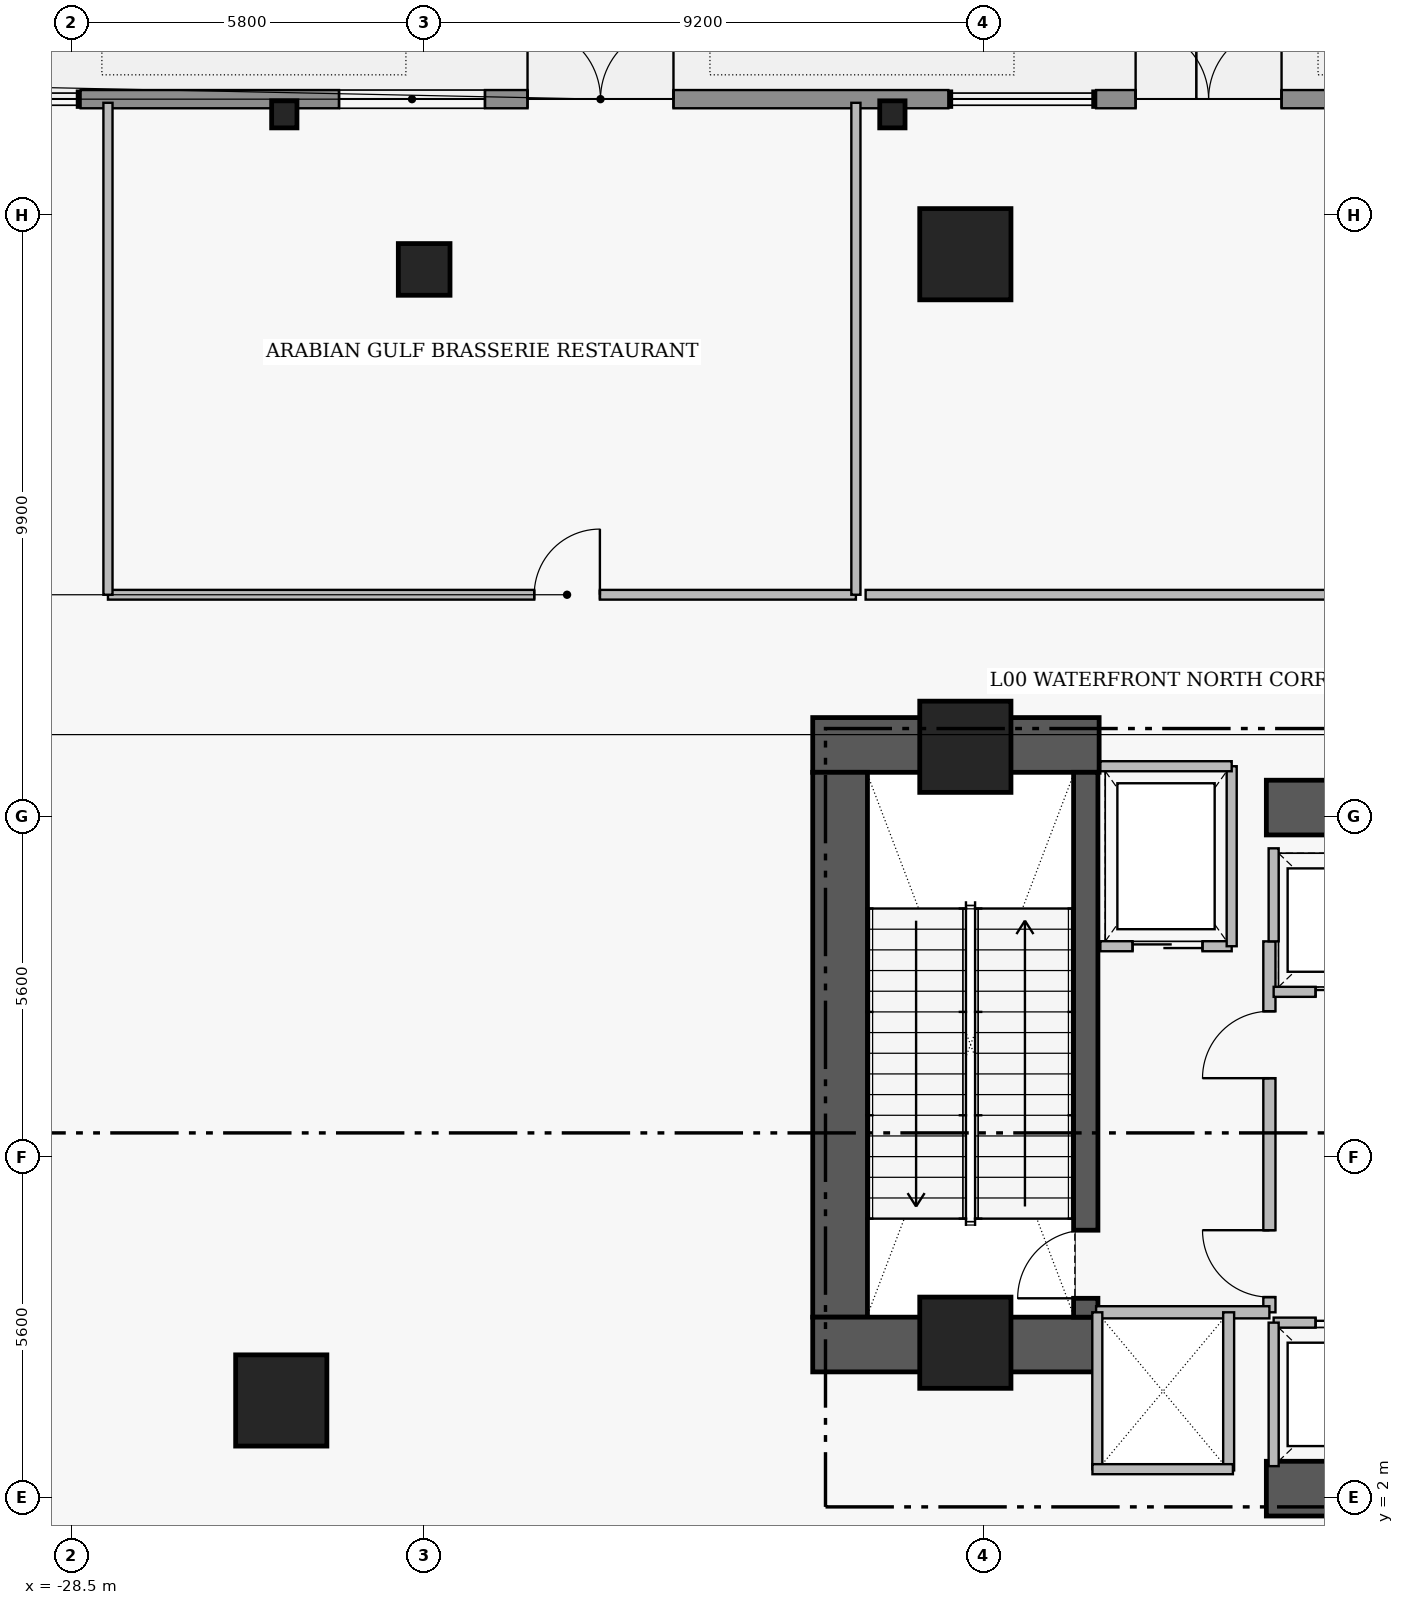
"""IFC4 building model, lengths in metres.
Left out: names, types, materials, properties, quantities, classifications, styles, units other than length and angle.
Written with IfcOpenShell. Run it as: python <this file> out.ifc"""

import sys

from ifc_helpers import new_model, si_unit, direction, frame, frame_2d, origin, origin_2d, place, context, subcontext, project, spatial, rectangle, i_section, extrude, element, fill, save


model = new_model("IFC4")
c1 = context("Model", 3, precision=1e-05, world=origin(), true_north=direction((0.0, 1.0)))
c2 = subcontext(c1, "Body", "Model", "MODEL_VIEW")
j1 = project(units=[si_unit("LENGTHUNIT", "METRE"), si_unit("PLANEANGLEUNIT", "RADIAN")], contexts=[c1])
p1 = place(None, origin())
s1 = spatial("IfcSite", under=j1, at=p1, CompositionType="ELEMENT")
p2 = place(p1, origin())
s2 = spatial("IfcBuilding", under=s1, at=p2, CompositionType="ELEMENT")
p3 = place(p2, origin())
s3 = spatial("IfcBuildingStorey", under=s2, at=p3, CompositionType="ELEMENT", Elevation=0.0)
p4 = place(p3, frame((-16.31, 14.38, 0.0), z_axis=(0.0, 0.0, 1.0), x_axis=(1.0, 0.0, 0.0)))
e1 = element("IfcWall", 1, at=p4, inside=s3, PredefinedType="SHEAR", context=c2, shape_type="SweptSolid", body=[
    extrude(rectangle(XDim=4.71, YDim=0.9, at=frame_2d((2.355, 0.0))), origin(), (0.0, 0.0, 1.0), 5.81),
])
p5 = place(p3, frame((-15.86, 4.97, 0.0), z_axis=(0.0, 0.0, 1.0), x_axis=(0.0, 1.0, 0.0)))
e2 = element("IfcWall", 2, at=p5, inside=s3, PredefinedType="SHEAR", context=c2, shape_type="SweptSolid", body=[
    extrude(rectangle(XDim=8.96, YDim=0.9, at=frame_2d((4.48, 0.0))), origin(), (0.0, 0.0, 1.0), 5.81),
])
p6 = place(p3, frame((-16.31, 4.52, 0.0), z_axis=(0.0, 0.0, 1.0), x_axis=(1.0, 0.0, 0.0)))
e3 = element("IfcWall", 3, at=p6, inside=s3, PredefinedType="SHEAR", context=c2, shape_type="SweptSolid", body=[
    extrude(rectangle(XDim=4.71, YDim=0.9, at=frame_2d((2.355, 0.0))), origin(), (0.0, 0.0, 1.0), 5.81),
])
for number, where, z_axis, x_axis in (
    (4, (-8.85, 2.15, 0.0), (0.0, 0.0, 1.0), (1.0, 0.0, 0.0)),
    (5, (-8.85, 13.35, 0.0), (0.0, 0.0, 1.0), (1.0, 0.0, 0.0)),
):
    element("IfcWall", number, at=place(p3, frame(where, z_axis=z_axis, x_axis=x_axis)), inside=s3, PredefinedType="SHEAR", context=c2, shape_type="SweptSolid", body=[
        extrude(rectangle(XDim=7.6, YDim=0.9, at=frame_2d((3.8, 0.0))), origin(), (0.0, 0.0, 1.0), 5.75),
    ])
p7 = place(p3, frame((-11.82, 4.97, 0.0), z_axis=(0.0, 0.0, 1.0), x_axis=(0.0, 1.0, 0.0)))
e6 = element("IfcWall", 6, at=p7, inside=s3, PredefinedType="SHEAR", context=c2, shape_type="SweptSolid", body=[
    extrude(rectangle(XDim=8.96, YDim=0.4, at=frame_2d((4.48, 0.0))), origin(), (0.0, 0.0, 1.0), 5.81),
])
p8 = place(p7, frame((0.31, 0.0, 0.0)))
e7 = element("IfcOpeningElement", 7, at=p8, cuts=e6, PredefinedType="OPENING", context=c2, shape_type="SweptSolid", body=[
    extrude(rectangle(XDim=1.12, YDim=2.22, at=frame_2d((0.56, 1.11))), frame((0.0, 0.21, 0.0), z_axis=(0.0, -1.0, 0.0), x_axis=(1.0, 0.0, 0.0)), (0.0, 0.0, 1.0), 0.42),
])
for number, where, z_axis, x_axis in (
    (8, (-13.8, 14.35, 0.0), (0.0, 0.0, 1.0), (1.0, 0.0, 0.0)),
    (9, (-13.8, 4.55, 0.0), (0.0, 0.0, 1.0), (1.0, 0.0, 0.0)),
    (10, (-13.8, 22.45, 0.0), (0.0, 0.0, 1.0), (1.0, 0.0, 0.0)),
    (11, (-25.05, 3.6, 0.0), (0.0, 0.0, 1.0), (1.0, 0.0, 0.0)),
):
    element("IfcColumn", number, at=place(p3, frame(where, z_axis=z_axis, x_axis=x_axis)), inside=s3, PredefinedType="COLUMN", context=c2, shape_type="SweptSolid", body=[
        extrude(rectangle(XDim=1.5, YDim=1.5, at=origin_2d()), origin(), (0.0, 0.0, 1.0), 6.0),
    ])
p9 = place(p3, frame((-22.7, 22.2, 0.0), z_axis=(0.0, 0.0, 1.0), x_axis=(1.0, 0.0, 0.0)))
e12 = element("IfcColumn", 12, at=p9, inside=s3, PredefinedType="COLUMN", context=c2, shape_type="SweptSolid", body=[
    extrude(rectangle(XDim=0.85, YDim=0.85, at=origin_2d()), origin(), (0.0, 0.0, 1.0), 6.0),
])
for number, where, z_axis, x_axis in (
    (13, (-25.0, 24.75, -0.27), (0.0, 0.0, 1.0), (1.0, 0.0, 0.0)),
    (14, (-15.0, 24.75, -0.27), (0.0, 0.0, 1.0), (1.0, 0.0, 0.0)),
):
    element("IfcColumn", number, at=place(p3, frame(where, z_axis=z_axis, x_axis=x_axis)), inside=s3, PredefinedType="PILASTER", context=c2, shape_type="SweptSolid", body=[
        extrude(i_section(OverallWidth=0.416, OverallDepth=0.445, WebThickness=0.039, FlangeThickness=0.063, at=origin_2d()), origin(), (0.0, 0.0, 1.0), 6.02),
    ])
p10 = place(p3, frame((-28.35, 25.0, 0.0), z_axis=(0.0, 0.0, 1.0), x_axis=(1.0, 0.0, 0.0)))
e15 = element("IfcWall", 15, at=p10, inside=s3, PredefinedType="STANDARD", context=c2, shape_type="SweptSolid", body=[
    extrude(rectangle(XDim=14.27, YDim=0.3, at=frame_2d((7.135, 0.0))), origin(), (0.0, 0.0, 1.0), 5.75),
])
p11 = place(p10, frame((7.35, 0.0, 0.0)))
e16 = element("IfcOpeningElement", 16, at=p11, cuts=e15, PredefinedType="OPENING", context=c2, shape_type="SweptSolid", body=[
    extrude(rectangle(XDim=2.4, YDim=2.45, at=frame_2d((1.2, 1.225))), frame((0.0, 0.16, 0.0), z_axis=(0.0, -1.0, 0.0), x_axis=(1.0, 0.0, 0.0)), (0.0, 0.0, 1.0), 0.32),
])
p12 = place(p10, frame((4.25, 0.0, 0.9)))
e17 = element("IfcOpeningElement", 17, at=p12, cuts=e15, PredefinedType="OPENING", context=c2, shape_type="SweptSolid", body=[
    extrude(rectangle(XDim=2.4, YDim=2.2, at=frame_2d((1.2, 1.1))), frame((0.0, 0.16, 0.0), z_axis=(0.0, -1.0, 0.0), x_axis=(1.0, 0.0, 0.0)), (0.0, 0.0, 1.0), 0.32),
])
p13 = place(p3, frame((-11.65, 25.0, 0.0), z_axis=(0.0, 0.0, 1.0), x_axis=(1.0, 0.0, 0.0)))
e18 = element("IfcWall", 18, at=p13, inside=s3, PredefinedType="STANDARD", context=c2, shape_type="SweptSolid", body=[
    extrude(rectangle(XDim=7.57, YDim=0.3, at=frame_2d((3.785, 0.0))), origin(), (0.0, 0.0, 1.0), 5.75),
])
p14 = place(p13, frame((0.65, 0.0, 0.0)))
e19 = element("IfcOpeningElement", 19, at=p14, cuts=e18, PredefinedType="OPENING", context=c2, shape_type="SweptSolid", body=[
    extrude(rectangle(XDim=2.4, YDim=2.45, at=frame_2d((1.2, 1.225))), frame((0.0, 0.16, 0.0), z_axis=(0.0, -1.0, 0.0), x_axis=(1.0, 0.0, 0.0)), (0.0, 0.0, 1.0), 0.32),
])
p15 = place(p3, frame((-8.8, 5.05, 0.0), z_axis=(0.0, 0.0, 1.0), x_axis=(0.0, 1.0, 0.0)))
e20 = element("IfcWall", 20, at=p15, inside=s3, PredefinedType="PARTITIONING", context=c2, shape_type="SweptSolid", body=[
    extrude(rectangle(XDim=6.1, YDim=0.2, at=frame_2d((3.05, 0.0))), origin(), (0.0, 0.0, 1.0), 5.75),
])
p16 = place(p15, frame((0.25, 0.0, 0.0)))
e21 = element("IfcOpeningElement", 21, at=p16, cuts=e20, PredefinedType="OPENING", context=c2, shape_type="SweptSolid", body=[
    extrude(rectangle(XDim=1.1, YDim=2.2, at=frame_2d((0.55, 1.1))), frame((0.0, 0.11, 0.0), z_axis=(0.0, -1.0, 0.0), x_axis=(1.0, 0.0, 0.0)), (0.0, 0.0, 1.0), 0.22),
])
p17 = place(p15, frame((3.85, 0.0, 0.0)))
e22 = element("IfcOpeningElement", 22, at=p17, cuts=e20, PredefinedType="OPENING", context=c2, shape_type="SweptSolid", body=[
    extrude(rectangle(XDim=1.1, YDim=2.2, at=frame_2d((0.55, 1.1))), frame((0.0, 0.11, 0.0), z_axis=(0.0, -1.0, 0.0), x_axis=(1.0, 0.0, 0.0)), (0.0, 0.0, 1.0), 0.22),
])
p18 = place(p3, frame((-11.58, 11.07, 0.0), z_axis=(0.0, 0.0, 1.0), x_axis=(1.0, 0.0, 0.0)))
e23 = element("IfcWall", 23, at=p18, inside=s3, PredefinedType="PARTITIONING", context=c2, shape_type="SweptSolid", body=[
    extrude(rectangle(XDim=2.16, YDim=0.165, at=frame_2d((1.08, 0.0))), origin(), (0.0, 0.0, 1.0), 5.75),
])
p19 = place(p18, frame((0.53, 0.0, 0.0)))
e24 = element("IfcOpeningElement", 24, at=p19, cuts=e23, PredefinedType="OPENING", context=c2, shape_type="SweptSolid", body=[
    extrude(rectangle(XDim=1.15, YDim=2.25, at=frame_2d((0.575, 1.125))), frame((0.0, 0.093, 0.0), z_axis=(0.0, -1.0, 0.0), x_axis=(1.0, 0.0, 0.0)), (0.0, 0.0, 1.0), 0.185),
])
p20 = place(p3, frame((-8.73, 4.88, 0.0), z_axis=(0.0, 0.0, 1.0), x_axis=(1.0, 0.0, 0.0)))
e25 = element("IfcWall", 25, at=p20, inside=s3, PredefinedType="PARTITIONING", context=c2, shape_type="SweptSolid", body=[
    extrude(rectangle(XDim=2.48, YDim=0.165, at=frame_2d((1.24, 0.0))), origin(), (0.0, 0.0, 1.0), 5.75),
])
p21 = place(p20, frame((0.69, 0.0, 0.0)))
e26 = element("IfcOpeningElement", 26, at=p21, cuts=e25, PredefinedType="OPENING", context=c2, shape_type="SweptSolid", body=[
    extrude(rectangle(XDim=1.1, YDim=2.25, at=frame_2d((0.55, 1.125))), frame((0.0, 0.093, 0.0), z_axis=(0.0, -1.0, 0.0), x_axis=(1.0, 0.0, 0.0)), (0.0, 0.0, 1.0), 0.185),
])
p22 = place(p3, frame((-8.73, 10.32, 0.0), z_axis=(0.0, 0.0, 1.0), x_axis=(1.0, 0.0, 0.0)))
e27 = element("IfcWall", 27, at=p22, inside=s3, PredefinedType="PARTITIONING", context=c2, shape_type="SweptSolid", body=[
    extrude(rectangle(XDim=2.48, YDim=0.165, at=frame_2d((1.24, 0.0))), origin(), (0.0, 0.0, 1.0), 5.75),
])
p23 = place(p22, frame((0.69, 0.0, 0.0)))
e28 = element("IfcOpeningElement", 28, at=p23, cuts=e27, PredefinedType="OPENING", context=c2, shape_type="SweptSolid", body=[
    extrude(rectangle(XDim=1.1, YDim=2.25, at=frame_2d((0.55, 1.125))), frame((0.0, 0.093, 0.0), z_axis=(0.0, -1.0, 0.0), x_axis=(1.0, 0.0, 0.0)), (0.0, 0.0, 1.0), 0.185),
])
p24 = place(p3, frame((-27.9, 16.85, 0.0), z_axis=(0.0, 0.0, 1.0), x_axis=(1.0, 0.0, 0.0)))
e29 = element("IfcWall", 29, at=p24, inside=s3, PredefinedType="PARTITIONING", context=c2, shape_type="SweptSolid", body=[
    extrude(rectangle(XDim=12.3, YDim=0.16, at=frame_2d((6.15, 0.0))), origin(), (0.0, 0.0, 1.0), 5.75),
])
p25 = place(p24, frame((7.01, 0.0, 0.0)))
e30 = element("IfcOpeningElement", 30, at=p25, cuts=e29, PredefinedType="OPENING", context=c2, shape_type="SweptSolid", body=[
    extrude(rectangle(XDim=1.08, YDim=2.18, at=frame_2d((0.54, 1.09))), frame((0.0, 0.09, 0.0), z_axis=(0.0, -1.0, 0.0), x_axis=(1.0, 0.0, 0.0)), (0.0, 0.0, 1.0), 0.18),
])
p26 = place(p3, frame((-15.44, 16.85, 0.0), z_axis=(0.0, 0.0, 1.0), x_axis=(1.0, 0.0, 0.0)))
e31 = element("IfcWall", 31, at=p26, inside=s3, PredefinedType="PARTITIONING", context=c2, shape_type="SweptSolid", body=[
    extrude(rectangle(XDim=30.88, YDim=0.16, at=frame_2d((15.44, 0.0))), origin(), (0.0, 0.0, 1.0), 5.217),
])
p27 = place(p26, frame((14.9, 0.0, 0.0)))
e32 = element("IfcOpeningElement", 32, at=p27, cuts=e31, PredefinedType="OPENING", context=c2, shape_type="SweptSolid", body=[
    extrude(rectangle(XDim=1.08, YDim=2.18, at=frame_2d((0.54, 1.09))), frame((0.0, 0.09, 0.0), z_axis=(0.0, -1.0, 0.0), x_axis=(1.0, 0.0, 0.0)), (0.0, 0.0, 1.0), 0.18),
])
p28 = place(p3, frame((-11.65, 5.05, 0.0), z_axis=(0.0, 0.0, 1.0), x_axis=(1.0, 0.0, 0.0)))
e33 = element("IfcWall", 33, at=p28, inside=s3, PredefinedType="PARTITIONING", context=c2, shape_type="SweptSolid", body=[
    extrude(rectangle(XDim=2.85, YDim=0.2, at=frame_2d((1.425, 0.0))), origin(), (0.0, 0.0, 1.0), 5.75),
])
p29 = place(p3, frame((-9.42, 11.07, 0.0), z_axis=(0.0, 0.0, 1.0), x_axis=(0.0, 1.0, 0.0)))
e34 = element("IfcWall", 34, at=p29, inside=s3, PredefinedType="PARTITIONING", context=c2, shape_type="SweptSolid", body=[
    extrude(rectangle(XDim=2.96, YDim=0.165, at=frame_2d((1.48, 0.0))), origin(), (0.0, 0.0, 1.0), 5.75),
])
p30 = place(p3, frame((-11.58, 14.03, 0.0), z_axis=(0.0, 0.0, 1.0), x_axis=(1.0, 0.0, 0.0)))
e35 = element("IfcWall", 35, at=p30, inside=s3, PredefinedType="PARTITIONING", context=c2, shape_type="SweptSolid", body=[
    extrude(rectangle(XDim=2.16, YDim=0.165, at=frame_2d((1.08, 0.0))), origin(), (0.0, 0.0, 1.0), 5.75),
])
p31 = place(p3, frame((-8.73, 2.52, 0.0), z_axis=(0.0, 0.0, 1.0), x_axis=(0.0, 1.0, 0.0)))
e36 = element("IfcWall", 36, at=p31, inside=s3, PredefinedType="PARTITIONING", context=c2, shape_type="SweptSolid", body=[
    extrude(rectangle(XDim=2.36, YDim=0.165, at=frame_2d((1.18, 0.0))), origin(), (0.0, 0.0, 1.0), 5.75),
])
p32 = place(p3, frame((-8.73, 11.15, 0.0), z_axis=(0.0, 0.0, 1.0), x_axis=(0.0, 1.0, 0.0)))
e37 = element("IfcWall", 37, at=p32, inside=s3, PredefinedType="PARTITIONING", context=c2, shape_type="SweptSolid", body=[
    extrude(rectangle(XDim=1.53, YDim=0.165, at=frame_2d((0.765, 0.0))), origin(), (0.0, 0.0, 1.0), 5.75),
])
p33 = place(p3, frame((-9.47, 2.45, 0.0), z_axis=(0.0, 0.0, 1.0), x_axis=(0.0, 1.0, 0.0)))
e38 = element("IfcWall", 38, at=p33, inside=s3, PredefinedType="PARTITIONING", context=c2, shape_type="SweptSolid", body=[
    extrude(rectangle(XDim=2.6, YDim=0.18, at=frame_2d((1.3, 0.0))), origin(), (0.0, 0.0, 1.0), 5.75),
])
p34 = place(p3, frame((-11.63, 2.47, 0.0), z_axis=(0.0, 0.0, 1.0), x_axis=(0.0, 1.0, 0.0)))
e39 = element("IfcWall", 39, at=p34, inside=s3, PredefinedType="PARTITIONING", context=c2, shape_type="SweptSolid", body=[
    extrude(rectangle(XDim=2.58, YDim=0.165, at=frame_2d((1.29, 0.0))), origin(), (0.0, 0.0, 1.0), 5.75),
])
p35 = place(p3, frame((-11.71, 2.47, 0.0), z_axis=(0.0, 0.0, 1.0), x_axis=(1.0, 0.0, 0.0)))
e40 = element("IfcWall", 40, at=p35, inside=s3, PredefinedType="PARTITIONING", context=c2, shape_type="SweptSolid", body=[
    extrude(rectangle(XDim=2.31, YDim=0.165, at=frame_2d((1.155, 0.0))), origin(), (0.0, 0.0, 1.0), 4.35),
])
for number, where, z_axis, x_axis in (
    (41, (-27.9, 16.85, 0.0), (0.0, 0.0, 1.0), (0.0, 1.0, 0.0)),
    (42, (-15.6, 16.85, 0.0), (0.0, 0.0, 1.0), (0.0, 1.0, 0.0)),
):
    element("IfcWall", number, at=place(p3, frame(where, z_axis=z_axis, x_axis=x_axis)), inside=s3, PredefinedType="PARTITIONING", context=c2, shape_type="SweptSolid", body=[
        extrude(rectangle(XDim=8.09, YDim=0.15, at=frame_2d((4.045, 0.0))), origin(), (0.0, 0.0, 1.0), 5.75),
    ])
p36 = place(p11, origin())
e43 = element("IfcDoor", 43, at=p36, inside=s3, OperationType="DOUBLE_DOOR_SINGLE_SWING", PredefinedType="DOOR", context=c2, shape_type="SweptSolid", body=[
    extrude(rectangle(XDim=2.4, YDim=2.45, at=frame_2d((1.2, 1.225))), frame((0.0, 0.025, 0.0), z_axis=(0.0, -1.0, 0.0), x_axis=(1.0, 0.0, 0.0)), (0.0, 0.0, 1.0), 0.05),
])
fill(e16, e43)
p37 = place(p12, origin())
e44 = element("IfcWindow", 44, at=p37, inside=s3, PartitioningType="SINGLE_PANEL", PredefinedType="WINDOW", context=c2, shape_type="SweptSolid", body=[
    extrude(rectangle(XDim=2.4, YDim=2.2, at=frame_2d((1.2, 1.1))), frame((0.0, 0.03, 0.0), z_axis=(0.0, -1.0, 0.0), x_axis=(1.0, 0.0, 0.0)), (0.0, 0.0, 1.0), 0.06),
])
fill(e17, e44)
p38 = place(p14, origin())
e45 = element("IfcDoor", 45, at=p38, inside=s3, OperationType="DOUBLE_DOOR_SINGLE_SWING", PredefinedType="DOOR", context=c2, shape_type="SweptSolid", body=[
    extrude(rectangle(XDim=2.4, YDim=2.45, at=frame_2d((1.2, 1.225))), frame((0.0, 0.025, 0.0), z_axis=(0.0, -1.0, 0.0), x_axis=(1.0, 0.0, 0.0)), (0.0, 0.0, 1.0), 0.05),
])
fill(e19, e45)
p39 = place(p8, origin())
e46 = element("IfcDoor", 46, at=p39, inside=s3, OperationType="SINGLE_SWING_LEFT", PredefinedType="DOOR", context=c2, shape_type="SweptSolid", body=[
    extrude(rectangle(XDim=1.12, YDim=2.22, at=frame_2d((0.56, 1.11))), frame((0.0, 0.025, 0.0), z_axis=(0.0, -1.0, 0.0), x_axis=(1.0, 0.0, 0.0)), (0.0, 0.0, 1.0), 0.05),
])
fill(e7, e46)
p40 = place(p16, origin())
e47 = element("IfcDoor", 47, at=p40, inside=s3, OperationType="SINGLE_SWING_RIGHT", PredefinedType="DOOR", context=c2, shape_type="SweptSolid", body=[
    extrude(rectangle(XDim=1.1, YDim=2.2, at=frame_2d((0.55, 1.1))), frame((0.0, 0.025, 0.0), z_axis=(0.0, -1.0, 0.0), x_axis=(1.0, 0.0, 0.0)), (0.0, 0.0, 1.0), 0.05),
])
fill(e21, e47)
p41 = place(p17, origin())
e48 = element("IfcDoor", 48, at=p41, inside=s3, OperationType="SINGLE_SWING_LEFT", PredefinedType="DOOR", context=c2, shape_type="SweptSolid", body=[
    extrude(rectangle(XDim=1.1, YDim=2.2, at=frame_2d((0.55, 1.1))), frame((0.0, 0.025, 0.0), z_axis=(0.0, -1.0, 0.0), x_axis=(1.0, 0.0, 0.0)), (0.0, 0.0, 1.0), 0.05),
])
fill(e22, e48)
p42 = place(p19, origin())
e49 = element("IfcDoor", 49, at=p42, inside=s3, OperationType="SLIDING_TO_LEFT", PredefinedType="DOOR", context=c2, shape_type="SweptSolid", body=[
    extrude(rectangle(XDim=1.15, YDim=2.25, at=frame_2d((0.575, 1.125))), frame((0.0, 0.025, 0.0), z_axis=(0.0, -1.0, 0.0), x_axis=(1.0, 0.0, 0.0)), (0.0, 0.0, 1.0), 0.05),
])
fill(e24, e49)
p43 = place(p21, origin())
e50 = element("IfcDoor", 50, at=p43, inside=s3, OperationType="SLIDING_TO_LEFT", PredefinedType="DOOR", context=c2, shape_type="SweptSolid", body=[
    extrude(rectangle(XDim=1.1, YDim=2.25, at=frame_2d((0.55, 1.125))), frame((0.0, 0.025, 0.0), z_axis=(0.0, -1.0, 0.0), x_axis=(1.0, 0.0, 0.0)), (0.0, 0.0, 1.0), 0.05),
])
fill(e26, e50)
p44 = place(p23, origin())
e51 = element("IfcDoor", 51, at=p44, inside=s3, OperationType="SLIDING_TO_LEFT", PredefinedType="DOOR", context=c2, shape_type="SweptSolid", body=[
    extrude(rectangle(XDim=1.1, YDim=2.25, at=frame_2d((0.55, 1.125))), frame((0.0, 0.025, 0.0), z_axis=(0.0, -1.0, 0.0), x_axis=(1.0, 0.0, 0.0)), (0.0, 0.0, 1.0), 0.05),
])
fill(e28, e51)
p45 = place(p25, origin())
e52 = element("IfcDoor", 52, at=p45, inside=s3, OperationType="SINGLE_SWING_RIGHT", PredefinedType="DOOR", context=c2, shape_type="SweptSolid", body=[
    extrude(rectangle(XDim=1.08, YDim=2.18, at=frame_2d((0.54, 1.09))), frame((0.0, 0.025, 0.0), z_axis=(0.0, -1.0, 0.0), x_axis=(1.0, 0.0, 0.0)), (0.0, 0.0, 1.0), 0.05),
])
fill(e30, e52)
save(model, sys.argv[1])
